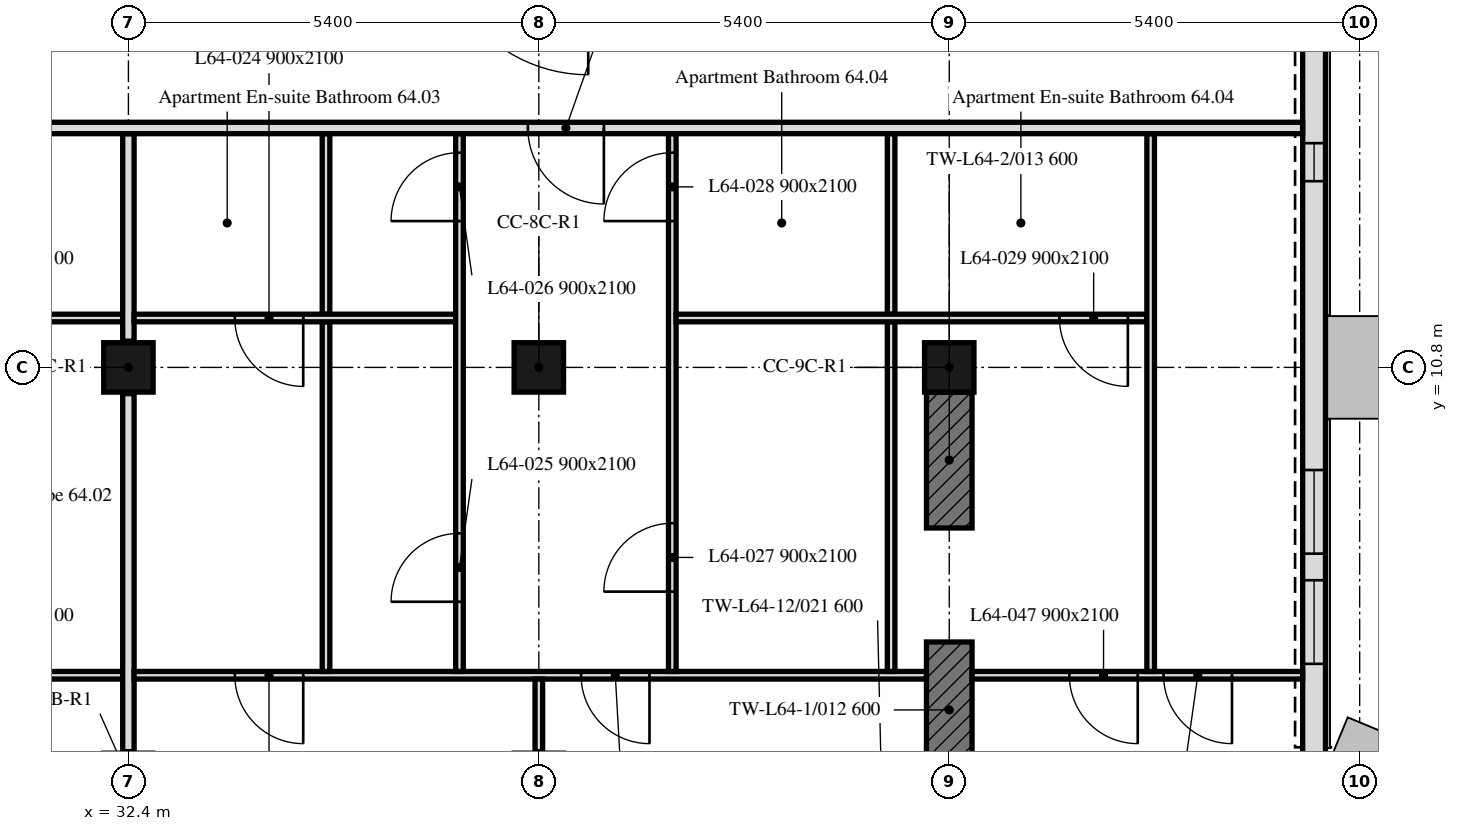
"""IFC4 building model, lengths in metres.
Left out: names, types, materials, properties, quantities, classifications, styles, units other than length and angle.
Written with IfcOpenShell. Run it as: python <this file> out.ifc"""

import sys

from ifc_helpers import new_model, si_unit, direction, frame, frame_2d, origin, origin_2d, place, context, subcontext, project, spatial, rectangle, extrude, element, fill, save


model = new_model("IFC4")
c1 = context("Model", 3, precision=1e-05, world=origin(), true_north=direction((0.0, 1.0)))
c2 = subcontext(c1, "Body", "Model", "MODEL_VIEW")
j1 = project(units=[si_unit("LENGTHUNIT", "METRE"), si_unit("PLANEANGLEUNIT", "RADIAN")], contexts=[c1])
p1 = place(None, origin())
s1 = spatial("IfcSite", under=j1, at=p1, CompositionType="ELEMENT")
p2 = place(p1, origin())
s2 = spatial("IfcBuilding", under=s1, at=p2, CompositionType="ELEMENT")
p3 = place(p2, frame((0.0, 0.0, 265.3)))
s3 = spatial("IfcBuildingStorey", under=s2, at=p3, CompositionType="ELEMENT", Elevation=265.3)
for number, where, z_axis, x_axis in (
    (1, (32.4, 10.8, 0.0), (0.0, 0.0, 1.0), (1.0, 0.0, 0.0)),
    (2, (37.8, 10.8, 0.0), (0.0, 0.0, 1.0), (1.0, 0.0, 0.0)),
    (3, (43.2, 10.8, 0.0), (0.0, 0.0, 1.0), (1.0, 0.0, 0.0)),
):
    element("IfcColumn", number, at=place(p3, frame(where, z_axis=z_axis, x_axis=x_axis)), inside=s3, PredefinedType="COLUMN", context=c2, shape_type="SweptSolid", body=[
        extrude(rectangle(XDim=0.65, YDim=0.65, at=origin_2d()), origin(), (0.0, 0.0, 1.0), 3.0),
    ])
for number, where, z_axis, x_axis in (
    (4, (43.2, 5.4, 0.0), (0.0, 0.0, 1.0), (0.0, 1.0, 0.0)),
    (5, (43.2, 8.688, 0.0), (0.0, 0.0, 1.0), (0.0, 1.0, 0.0)),
):
    element("IfcWall", number, at=place(p3, frame(where, z_axis=z_axis, x_axis=x_axis)), inside=s3, PredefinedType="SHEAR", context=c2, shape_type="SweptSolid", body=[
        extrude(rectangle(XDim=1.788, YDim=0.6, at=frame_2d((0.894, 0.0))), origin(), (0.0, 0.0, 1.0), 3.0),
    ])
p4 = place(p3, frame((48.0, 5.586, 0.0), z_axis=(0.0, 0.0, 1.0), x_axis=(0.0, 1.0, 0.0)))
e6 = element("IfcWall", 6, at=p4, inside=s3, PredefinedType="SOLIDWALL", context=c2, shape_type="SweptSolid", body=[
    extrude(rectangle(XDim=32.027, YDim=0.3, at=frame_2d((16.014, 0.0))), origin(), (0.0, 0.0, 1.0), 3.0),
])
p5 = place(p4, frame((1.314, 0.0, 0.9)))
e7 = element("IfcOpeningElement", 7, at=p5, cuts=e6, PredefinedType="OPENING", context=c2, shape_type="SweptSolid", body=[
    extrude(rectangle(XDim=1.1, YDim=1.7, at=frame_2d((0.55, 0.85))), frame((0.0, 0.16, 0.0), z_axis=(0.0, -1.0, 0.0), x_axis=(1.0, 0.0, 0.0)), (0.0, 0.0, 1.0), 0.32),
])
p6 = place(p4, frame((2.764, 0.0, 0.9)))
e8 = element("IfcOpeningElement", 8, at=p6, cuts=e6, PredefinedType="OPENING", context=c2, shape_type="SweptSolid", body=[
    extrude(rectangle(XDim=1.1, YDim=1.7, at=frame_2d((0.55, 0.85))), frame((0.0, 0.16, 0.0), z_axis=(0.0, -1.0, 0.0), x_axis=(1.0, 0.0, 0.0)), (0.0, 0.0, 1.0), 0.32),
])
p7 = place(p4, frame((7.664, 0.0, 0.9)))
e9 = element("IfcOpeningElement", 9, at=p7, cuts=e6, PredefinedType="OPENING", context=c2, shape_type="SweptSolid", body=[
    extrude(rectangle(XDim=0.5, YDim=1.7, at=frame_2d((0.25, 0.85))), frame((0.0, 0.16, 0.0), z_axis=(0.0, -1.0, 0.0), x_axis=(1.0, 0.0, 0.0)), (0.0, 0.0, 1.0), 0.32),
])
p8 = place(p4, frame((13.064, 0.0, 0.9)))
e10 = element("IfcOpeningElement", 10, at=p8, cuts=e6, PredefinedType="OPENING", context=c2, shape_type="SweptSolid", body=[
    extrude(rectangle(XDim=0.5, YDim=1.7, at=frame_2d((0.25, 0.85))), frame((0.0, 0.16, 0.0), z_axis=(0.0, -1.0, 0.0), x_axis=(1.0, 0.0, 0.0)), (0.0, 0.0, 1.0), 0.32),
])
p9 = place(p4, frame((18.464, 0.0, 0.9)))
e11 = element("IfcOpeningElement", 11, at=p9, cuts=e6, PredefinedType="OPENING", context=c2, shape_type="SweptSolid", body=[
    extrude(rectangle(XDim=0.5, YDim=1.7, at=frame_2d((0.25, 0.85))), frame((0.0, 0.16, 0.0), z_axis=(0.0, -1.0, 0.0), x_axis=(1.0, 0.0, 0.0)), (0.0, 0.0, 1.0), 0.32),
])
p10 = place(p4, frame((23.864, 0.0, 0.9)))
e12 = element("IfcOpeningElement", 12, at=p10, cuts=e6, PredefinedType="OPENING", context=c2, shape_type="SweptSolid", body=[
    extrude(rectangle(XDim=0.5, YDim=1.7, at=frame_2d((0.25, 0.85))), frame((0.0, 0.16, 0.0), z_axis=(0.0, -1.0, 0.0), x_axis=(1.0, 0.0, 0.0)), (0.0, 0.0, 1.0), 0.32),
])
p11 = place(p4, frame((28.239, 0.0, 0.9)))
e13 = element("IfcOpeningElement", 13, at=p11, cuts=e6, PredefinedType="OPENING", context=c2, shape_type="SweptSolid", body=[
    extrude(rectangle(XDim=0.65, YDim=1.7, at=frame_2d((0.325, 0.85))), frame((0.0, 0.16, 0.0), z_axis=(0.0, -1.0, 0.0), x_axis=(1.0, 0.0, 0.0)), (0.0, 0.0, 1.0), 0.32),
])
p12 = place(p4, frame((29.764, 0.0, 0.9)))
e14 = element("IfcOpeningElement", 14, at=p12, cuts=e6, PredefinedType="OPENING", context=c2, shape_type="SweptSolid", body=[
    extrude(rectangle(XDim=1.1, YDim=1.7, at=frame_2d((0.55, 0.85))), frame((0.0, 0.16, 0.0), z_axis=(0.0, -1.0, 0.0), x_axis=(1.0, 0.0, 0.0)), (0.0, 0.0, 1.0), 0.32),
])
p13 = place(p3, frame((32.325, 6.75, 0.0), z_axis=(0.0, 0.0, 1.0), x_axis=(-1.0, 0.0, 0.0)))
e15 = element("IfcWall", 15, at=p13, inside=s3, PredefinedType="PARTITIONING", context=c2, shape_type="SweptSolid", body=[
    extrude(rectangle(XDim=5.355, YDim=0.1, at=frame_2d((2.677, 0.0))), origin(), (0.0, 0.0, 1.0), 3.0),
])
p14 = place(p13, frame((1.949, 0.0, 0.0)))
e16 = element("IfcOpeningElement", 16, at=p14, cuts=e15, PredefinedType="OPENING", context=c2, shape_type="SweptSolid", body=[
    extrude(rectangle(XDim=0.9, YDim=2.1, at=frame_2d((0.45, 1.05))), frame((0.0, 0.05, 0.0), z_axis=(0.0, -1.0, 0.0), x_axis=(1.0, 0.0, 0.0)), (0.0, 0.0, 1.0), 0.1),
])
p15 = place(p3, frame((32.325, 11.45, 0.0), z_axis=(0.0, 0.0, 1.0), x_axis=(-1.0, 0.0, 0.0)))
e17 = element("IfcWall", 17, at=p15, inside=s3, PredefinedType="PARTITIONING", context=c2, shape_type="SweptSolid", body=[
    extrude(rectangle(XDim=5.255, YDim=0.1, at=frame_2d((2.627, 0.0))), origin(), (0.0, 0.0, 1.0), 3.0),
])
p16 = place(p15, frame((1.949, 0.0, 0.0)))
e18 = element("IfcOpeningElement", 18, at=p16, cuts=e17, PredefinedType="OPENING", context=c2, shape_type="SweptSolid", body=[
    extrude(rectangle(XDim=0.9, YDim=2.1, at=frame_2d((0.45, 1.05))), frame((0.0, 0.05, 0.0), z_axis=(0.0, -1.0, 0.0), x_axis=(1.0, 0.0, 0.0)), (0.0, 0.0, 1.0), 0.1),
])
p17 = place(p3, frame((32.4, 5.745, 0.0), z_axis=(0.0, 0.0, 1.0), x_axis=(0.0, 1.0, 0.0)))
e19 = element("IfcWall", 19, at=p17, inside=s3, PredefinedType="PARTITIONING", context=c2, shape_type="SweptSolid", body=[
    extrude(rectangle(XDim=4.71, YDim=0.15, at=frame_2d((2.355, 0.0))), origin(), (0.0, 0.0, 1.0), 2.4),
])
p18 = place(p3, frame((32.4, 11.145, 0.0), z_axis=(0.0, 0.0, 1.0), x_axis=(0.0, 1.0, 0.0)))
e20 = element("IfcWall", 20, at=p18, inside=s3, PredefinedType="PARTITIONING", context=c2, shape_type="SweptSolid", body=[
    extrude(rectangle(XDim=2.73, YDim=0.15, at=frame_2d((1.365, 0.0))), origin(), (0.0, 0.0, 1.0), 2.4),
])
p19 = place(p3, frame((42.899, 6.75, 0.0), z_axis=(0.0, 0.0, 1.0), x_axis=(-1.0, 0.0, 0.0)))
e21 = element("IfcWall", 21, at=p19, inside=s3, PredefinedType="PARTITIONING", context=c2, shape_type="SweptSolid", body=[
    extrude(rectangle(XDim=10.424, YDim=0.1, at=frame_2d((5.212, 0.0))), origin(), (0.0, 0.0, 1.0), 2.4),
])
p20 = place(p19, frame((8.199, 0.0, 0.0)))
e22 = element("IfcOpeningElement", 22, at=p20, cuts=e21, PredefinedType="OPENING", context=c2, shape_type="SweptSolid", body=[
    extrude(rectangle(XDim=0.9, YDim=2.1, at=frame_2d((0.45, 1.05))), frame((0.0, 0.05, 0.0), z_axis=(0.0, -1.0, 0.0), x_axis=(1.0, 0.0, 0.0)), (0.0, 0.0, 1.0), 0.1),
])
p21 = place(p19, frame((3.643, 0.0, 0.0)))
e23 = element("IfcOpeningElement", 23, at=p21, cuts=e21, PredefinedType="OPENING", context=c2, shape_type="SweptSolid", body=[
    extrude(rectangle(XDim=0.9, YDim=2.1, at=frame_2d((0.45, 1.05))), frame((0.0, 0.05, 0.0), z_axis=(0.0, -1.0, 0.0), x_axis=(1.0, 0.0, 0.0)), (0.0, 0.0, 1.0), 0.1),
])
p22 = place(p3, frame((37.8, 5.745, 0.0), z_axis=(0.0, 0.0, 1.0), x_axis=(0.0, 1.0, 0.0)))
e24 = element("IfcWall", 24, at=p22, inside=s3, PredefinedType="PARTITIONING", context=c2, shape_type="SweptSolid", body=[
    extrude(rectangle(XDim=0.955, YDim=0.1, at=frame_2d((0.478, 0.0))), origin(), (0.0, 0.0, 1.0), 2.4),
])
p23 = place(p3, frame((47.849, 6.75, 0.0), z_axis=(0.0, 0.0, 1.0), x_axis=(-1.0, 0.0, 0.0)))
e25 = element("IfcWall", 25, at=p23, inside=s3, PredefinedType="PARTITIONING", context=c2, shape_type="SweptSolid", body=[
    extrude(rectangle(XDim=4.348, YDim=0.1, at=frame_2d((2.174, 0.0))), origin(), (0.0, 0.0, 1.0), 3.0),
])
p24 = place(p23, frame((0.929, 0.0, 0.0)))
e26 = element("IfcOpeningElement", 26, at=p24, cuts=e25, PredefinedType="OPENING", context=c2, shape_type="SweptSolid", body=[
    extrude(rectangle(XDim=0.9, YDim=2.1, at=frame_2d((0.45, 1.05))), frame((0.0, 0.05, 0.0), z_axis=(0.0, -1.0, 0.0), x_axis=(1.0, 0.0, 0.0)), (0.0, 0.0, 1.0), 0.1),
])
p25 = place(p23, frame((2.169, 0.0, 0.0)))
e27 = element("IfcOpeningElement", 27, at=p25, cuts=e25, PredefinedType="OPENING", context=c2, shape_type="SweptSolid", body=[
    extrude(rectangle(XDim=0.9, YDim=2.1, at=frame_2d((0.45, 1.05))), frame((0.0, 0.05, 0.0), z_axis=(0.0, -1.0, 0.0), x_axis=(1.0, 0.0, 0.0)), (0.0, 0.0, 1.0), 0.1),
])
p26 = place(p3, frame((35.0, 6.8, 0.0), z_axis=(0.0, 0.0, 1.0), x_axis=(0.0, 1.0, 0.0)))
e28 = element("IfcWall", 28, at=p26, inside=s3, PredefinedType="PARTITIONING", context=c2, shape_type="SweptSolid", body=[
    extrude(rectangle(XDim=4.6, YDim=0.1, at=frame_2d((2.3, 0.0))), origin(), (0.0, 0.0, 1.0), 2.4),
])
p27 = place(p3, frame((35.0, 11.5, 0.0), z_axis=(0.0, 0.0, 1.0), x_axis=(0.0, 1.0, 0.0)))
e29 = element("IfcWall", 29, at=p27, inside=s3, PredefinedType="PARTITIONING", context=c2, shape_type="SweptSolid", body=[
    extrude(rectangle(XDim=2.375, YDim=0.1, at=frame_2d((1.188, 0.0))), origin(), (0.0, 0.0, 1.0), 3.0),
])
p28 = place(p3, frame((36.706, 11.45, 0.0), z_axis=(0.0, 0.0, 1.0), x_axis=(-1.0, 0.0, 0.0)))
e30 = element("IfcWall", 30, at=p28, inside=s3, PredefinedType="PARTITIONING", context=c2, shape_type="SweptSolid", body=[
    extrude(rectangle(XDim=4.231, YDim=0.1, at=frame_2d((2.115, 0.0))), origin(), (0.0, 0.0, 1.0), 3.0),
])
p29 = place(p28, frame((2.006, 0.0, 0.0)))
e31 = element("IfcOpeningElement", 31, at=p29, cuts=e30, PredefinedType="OPENING", context=c2, shape_type="SweptSolid", body=[
    extrude(rectangle(XDim=0.9, YDim=2.1, at=frame_2d((0.45, 1.05))), frame((0.0, 0.05, 0.0), z_axis=(0.0, -1.0, 0.0), x_axis=(1.0, 0.0, 0.0)), (0.0, 0.0, 1.0), 0.1),
])
p30 = place(p3, frame((36.756, 6.8, 0.0), z_axis=(0.0, 0.0, 1.0), x_axis=(0.0, 1.0, 0.0)))
e32 = element("IfcWall", 32, at=p30, inside=s3, PredefinedType="PARTITIONING", context=c2, shape_type="SweptSolid", body=[
    extrude(rectangle(XDim=7.075, YDim=0.1, at=frame_2d((3.538, 0.0))), origin(), (0.0, 0.0, 1.0), 2.4),
])
p31 = place(p30, frame((0.917, 0.0, 0.0)))
e33 = element("IfcOpeningElement", 33, at=p31, cuts=e32, PredefinedType="OPENING", context=c2, shape_type="SweptSolid", body=[
    extrude(rectangle(XDim=0.9, YDim=2.1, at=frame_2d((0.45, 1.05))), frame((0.0, 0.05, 0.0), z_axis=(0.0, -1.0, 0.0), x_axis=(1.0, 0.0, 0.0)), (0.0, 0.0, 1.0), 0.1),
])
p32 = place(p30, frame((5.925, 0.0, 0.0)))
e34 = element("IfcOpeningElement", 34, at=p32, cuts=e32, PredefinedType="OPENING", context=c2, shape_type="SweptSolid", body=[
    extrude(rectangle(XDim=0.9, YDim=2.1, at=frame_2d((0.45, 1.05))), frame((0.0, 0.05, 0.0), z_axis=(0.0, -1.0, 0.0), x_axis=(1.0, 0.0, 0.0)), (0.0, 0.0, 1.0), 0.1),
])
p33 = place(p3, frame((39.556, 6.8, 0.0), z_axis=(0.0, 0.0, 1.0), x_axis=(0.0, 1.0, 0.0)))
e35 = element("IfcWall", 35, at=p33, inside=s3, PredefinedType="PARTITIONING", context=c2, shape_type="SweptSolid", body=[
    extrude(rectangle(XDim=7.075, YDim=0.1, at=frame_2d((3.538, 0.0))), origin(), (0.0, 0.0, 1.0), 2.4),
])
p34 = place(p33, frame((1.05, 0.0, 0.0)))
e36 = element("IfcOpeningElement", 36, at=p34, cuts=e35, PredefinedType="OPENING", context=c2, shape_type="SweptSolid", body=[
    extrude(rectangle(XDim=0.9, YDim=2.1, at=frame_2d((0.45, 1.05))), frame((0.0, 0.05, 0.0), z_axis=(0.0, -1.0, 0.0), x_axis=(1.0, 0.0, 0.0)), (0.0, 0.0, 1.0), 0.1),
])
p35 = place(p33, frame((5.925, 0.0, 0.0)))
e37 = element("IfcOpeningElement", 37, at=p35, cuts=e35, PredefinedType="OPENING", context=c2, shape_type="SweptSolid", body=[
    extrude(rectangle(XDim=0.9, YDim=2.1, at=frame_2d((0.45, 1.05))), frame((0.0, 0.05, 0.0), z_axis=(0.0, -1.0, 0.0), x_axis=(1.0, 0.0, 0.0)), (0.0, 0.0, 1.0), 0.1),
])
p36 = place(p3, frame((42.435, 6.8, 0.0), z_axis=(0.0, 0.0, 1.0), x_axis=(0.0, 1.0, 0.0)))
e38 = element("IfcWall", 38, at=p36, inside=s3, PredefinedType="PARTITIONING", context=c2, shape_type="SweptSolid", body=[
    extrude(rectangle(XDim=4.6, YDim=0.1, at=frame_2d((2.3, 0.0))), origin(), (0.0, 0.0, 1.0), 2.4),
])
p37 = place(p3, frame((42.435, 11.5, 0.0), z_axis=(0.0, 0.0, 1.0), x_axis=(0.0, 1.0, 0.0)))
e39 = element("IfcWall", 39, at=p37, inside=s3, PredefinedType="PARTITIONING", context=c2, shape_type="SweptSolid", body=[
    extrude(rectangle(XDim=2.375, YDim=0.1, at=frame_2d((1.188, 0.0))), origin(), (0.0, 0.0, 1.0), 3.0),
])
p38 = place(p3, frame((45.8, 11.45, 0.0), z_axis=(0.0, 0.0, 1.0), x_axis=(-1.0, 0.0, 0.0)))
e40 = element("IfcWall", 40, at=p38, inside=s3, PredefinedType="PARTITIONING", context=c2, shape_type="SweptSolid", body=[
    extrude(rectangle(XDim=6.194, YDim=0.1, at=frame_2d((3.097, 0.0))), origin(), (0.0, 0.0, 1.0), 3.0),
])
p39 = place(p38, frame((0.25, 0.0, 0.0)))
e41 = element("IfcOpeningElement", 41, at=p39, cuts=e40, PredefinedType="OPENING", context=c2, shape_type="SweptSolid", body=[
    extrude(rectangle(XDim=0.9, YDim=2.1, at=frame_2d((0.45, 1.05))), frame((0.0, 0.05, 0.0), z_axis=(0.0, -1.0, 0.0), x_axis=(1.0, 0.0, 0.0)), (0.0, 0.0, 1.0), 0.1),
])
p40 = place(p3, frame((45.85, 6.8, 0.0), z_axis=(0.0, 0.0, 1.0), x_axis=(0.0, 1.0, 0.0)))
e42 = element("IfcWall", 42, at=p40, inside=s3, PredefinedType="PARTITIONING", context=c2, shape_type="SweptSolid", body=[
    extrude(rectangle(XDim=7.075, YDim=0.1, at=frame_2d((3.538, 0.0))), origin(), (0.0, 0.0, 1.0), 2.4),
])
p41 = place(p3, frame((47.849, 13.95, 0.0), z_axis=(0.0, 0.0, 1.0), x_axis=(-1.0, 0.0, 0.0)))
e43 = element("IfcWall", 43, at=p41, inside=s3, PredefinedType="PARTITIONING", context=c2, shape_type="SweptSolid", body=[
    extrude(rectangle(XDim=41.698, YDim=0.15, at=frame_2d((20.849, 0.0))), origin(), (0.0, 0.0, 1.0), 2.4),
])
p42 = place(p41, frame((37.749, 0.0, 0.0)))
e44 = element("IfcOpeningElement", 44, at=p42, cuts=e43, PredefinedType="OPENING", context=c2, shape_type="SweptSolid", body=[
    extrude(rectangle(XDim=1.0, YDim=2.1, at=frame_2d((0.5, 1.05))), frame((0.0, 0.075, 0.0), z_axis=(0.0, -1.0, 0.0), x_axis=(1.0, 0.0, 0.0)), (0.0, 0.0, 1.0), 0.15),
])
p43 = place(p41, frame((32.962, 0.0, 0.0)))
e45 = element("IfcOpeningElement", 45, at=p43, cuts=e43, PredefinedType="OPENING", context=c2, shape_type="SweptSolid", body=[
    extrude(rectangle(XDim=1.0, YDim=2.1, at=frame_2d((0.5, 1.05))), frame((0.0, 0.075, 0.0), z_axis=(0.0, -1.0, 0.0), x_axis=(1.0, 0.0, 0.0)), (0.0, 0.0, 1.0), 0.15),
])
p44 = place(p41, frame((22.179, 0.0, 0.0)))
e46 = element("IfcOpeningElement", 46, at=p44, cuts=e43, PredefinedType="OPENING", context=c2, shape_type="SweptSolid", body=[
    extrude(rectangle(XDim=1.0, YDim=2.1, at=frame_2d((0.5, 1.05))), frame((0.0, 0.075, 0.0), z_axis=(0.0, -1.0, 0.0), x_axis=(1.0, 0.0, 0.0)), (0.0, 0.0, 1.0), 0.15),
])
p45 = place(p41, frame((9.193, 0.0, 0.0)))
e47 = element("IfcOpeningElement", 47, at=p45, cuts=e43, PredefinedType="OPENING", context=c2, shape_type="SweptSolid", body=[
    extrude(rectangle(XDim=1.0, YDim=2.1, at=frame_2d((0.5, 1.05))), frame((0.0, 0.075, 0.0), z_axis=(0.0, -1.0, 0.0), x_axis=(1.0, 0.0, 0.0)), (0.0, 0.0, 1.0), 0.15),
])
p46 = place(p5, origin())
e48 = element("IfcWindow", 48, at=p46, inside=s3, PartitioningType="SINGLE_PANEL", PredefinedType="WINDOW", context=c2, shape_type="SweptSolid", body=[
    extrude(rectangle(XDim=1.1, YDim=1.7, at=frame_2d((0.55, 0.85))), frame((0.0, 0.03, 0.0), z_axis=(0.0, -1.0, 0.0), x_axis=(1.0, 0.0, 0.0)), (0.0, 0.0, 1.0), 0.06),
])
fill(e7, e48)
p47 = place(p6, origin())
e49 = element("IfcWindow", 49, at=p47, inside=s3, PartitioningType="SINGLE_PANEL", PredefinedType="WINDOW", context=c2, shape_type="SweptSolid", body=[
    extrude(rectangle(XDim=1.1, YDim=1.7, at=frame_2d((0.55, 0.85))), frame((0.0, 0.03, 0.0), z_axis=(0.0, -1.0, 0.0), x_axis=(1.0, 0.0, 0.0)), (0.0, 0.0, 1.0), 0.06),
])
fill(e8, e49)
p48 = place(p7, origin())
e50 = element("IfcWindow", 50, at=p48, inside=s3, PartitioningType="SINGLE_PANEL", PredefinedType="WINDOW", context=c2, shape_type="SweptSolid", body=[
    extrude(rectangle(XDim=0.5, YDim=1.7, at=frame_2d((0.25, 0.85))), frame((0.0, 0.03, 0.0), z_axis=(0.0, -1.0, 0.0), x_axis=(1.0, 0.0, 0.0)), (0.0, 0.0, 1.0), 0.06),
])
fill(e9, e50)
p49 = place(p24, origin())
e51 = element("IfcDoor", 51, at=p49, inside=s3, OperationType="SINGLE_SWING_LEFT", PredefinedType="DOOR", context=c2, shape_type="SweptSolid", body=[
    extrude(rectangle(XDim=0.9, YDim=2.1, at=frame_2d((0.45, 1.05))), frame((0.0, 0.025, 0.0), z_axis=(0.0, -1.0, 0.0), x_axis=(1.0, 0.0, 0.0)), (0.0, 0.0, 1.0), 0.05),
])
fill(e26, e51)
p50 = place(p29, origin())
e52 = element("IfcDoor", 52, at=p50, inside=s3, OperationType="SINGLE_SWING_LEFT", PredefinedType="DOOR", context=c2, shape_type="SweptSolid", body=[
    extrude(rectangle(XDim=0.9, YDim=2.1, at=frame_2d((0.45, 1.05))), frame((0.0, 0.025, 0.0), z_axis=(0.0, -1.0, 0.0), x_axis=(1.0, 0.0, 0.0)), (0.0, 0.0, 1.0), 0.05),
])
fill(e31, e52)
p51 = place(p31, origin())
e53 = element("IfcDoor", 53, at=p51, inside=s3, OperationType="SINGLE_SWING_RIGHT", PredefinedType="DOOR", context=c2, shape_type="SweptSolid", body=[
    extrude(rectangle(XDim=0.9, YDim=2.1, at=frame_2d((0.45, 1.05))), frame((0.0, 0.025, 0.0), z_axis=(0.0, -1.0, 0.0), x_axis=(1.0, 0.0, 0.0)), (0.0, 0.0, 1.0), 0.05),
])
fill(e33, e53)
p52 = place(p32, origin())
e54 = element("IfcDoor", 54, at=p52, inside=s3, OperationType="SINGLE_SWING_LEFT", PredefinedType="DOOR", context=c2, shape_type="SweptSolid", body=[
    extrude(rectangle(XDim=0.9, YDim=2.1, at=frame_2d((0.45, 1.05))), frame((0.0, 0.025, 0.0), z_axis=(0.0, -1.0, 0.0), x_axis=(1.0, 0.0, 0.0)), (0.0, 0.0, 1.0), 0.05),
])
fill(e34, e54)
p53 = place(p34, origin())
e55 = element("IfcDoor", 55, at=p53, inside=s3, OperationType="SINGLE_SWING_LEFT", PredefinedType="DOOR", context=c2, shape_type="SweptSolid", body=[
    extrude(rectangle(XDim=0.9, YDim=2.1, at=frame_2d((0.45, 1.05))), frame((0.0, 0.025, 0.0), z_axis=(0.0, -1.0, 0.0), x_axis=(1.0, 0.0, 0.0)), (0.0, 0.0, 1.0), 0.05),
])
fill(e36, e55)
p54 = place(p35, origin())
e56 = element("IfcDoor", 56, at=p54, inside=s3, OperationType="SINGLE_SWING_LEFT", PredefinedType="DOOR", context=c2, shape_type="SweptSolid", body=[
    extrude(rectangle(XDim=0.9, YDim=2.1, at=frame_2d((0.45, 1.05))), frame((0.0, 0.025, 0.0), z_axis=(0.0, -1.0, 0.0), x_axis=(1.0, 0.0, 0.0)), (0.0, 0.0, 1.0), 0.05),
])
fill(e37, e56)
p55 = place(p39, origin())
e57 = element("IfcDoor", 57, at=p55, inside=s3, OperationType="SINGLE_SWING_LEFT", PredefinedType="DOOR", context=c2, shape_type="SweptSolid", body=[
    extrude(rectangle(XDim=0.9, YDim=2.1, at=frame_2d((0.45, 1.05))), frame((0.0, 0.025, 0.0), z_axis=(0.0, -1.0, 0.0), x_axis=(1.0, 0.0, 0.0)), (0.0, 0.0, 1.0), 0.05),
])
fill(e41, e57)
p56 = place(p20, origin())
e58 = element("IfcDoor", 58, at=p56, inside=s3, OperationType="SINGLE_SWING_LEFT", PredefinedType="DOOR", context=c2, shape_type="SweptSolid", body=[
    extrude(rectangle(XDim=0.9, YDim=2.1, at=frame_2d((0.45, 1.05))), frame((0.0, 0.025, 0.0), z_axis=(0.0, -1.0, 0.0), x_axis=(1.0, 0.0, 0.0)), (0.0, 0.0, 1.0), 0.05),
])
fill(e22, e58)
p57 = place(p25, origin())
e59 = element("IfcDoor", 59, at=p57, inside=s3, OperationType="SINGLE_SWING_RIGHT", PredefinedType="DOOR", context=c2, shape_type="SweptSolid", body=[
    extrude(rectangle(XDim=0.9, YDim=2.1, at=frame_2d((0.45, 1.05))), frame((0.0, 0.025, 0.0), z_axis=(0.0, -1.0, 0.0), x_axis=(1.0, 0.0, 0.0)), (0.0, 0.0, 1.0), 0.05),
])
fill(e27, e59)
p58 = place(p21, origin())
e60 = element("IfcDoor", 60, at=p58, inside=s3, OperationType="SINGLE_SWING_LEFT", PredefinedType="DOOR", context=c2, shape_type="SweptSolid", body=[
    extrude(rectangle(XDim=0.9, YDim=2.1, at=frame_2d((0.45, 1.05))), frame((0.0, 0.025, 0.0), z_axis=(0.0, -1.0, 0.0), x_axis=(1.0, 0.0, 0.0)), (0.0, 0.0, 1.0), 0.05),
])
fill(e23, e60)
p59 = place(p45, origin())
e61 = element("IfcDoor", 61, at=p59, inside=s3, OperationType="SINGLE_SWING_LEFT", PredefinedType="DOOR", context=c2, shape_type="SweptSolid", body=[
    extrude(rectangle(XDim=1.0, YDim=2.1, at=frame_2d((0.5, 1.05))), frame((0.0, 0.025, 0.0), z_axis=(0.0, -1.0, 0.0), x_axis=(1.0, 0.0, 0.0)), (0.0, 0.0, 1.0), 0.05),
])
fill(e47, e61)
save(model, sys.argv[1])
